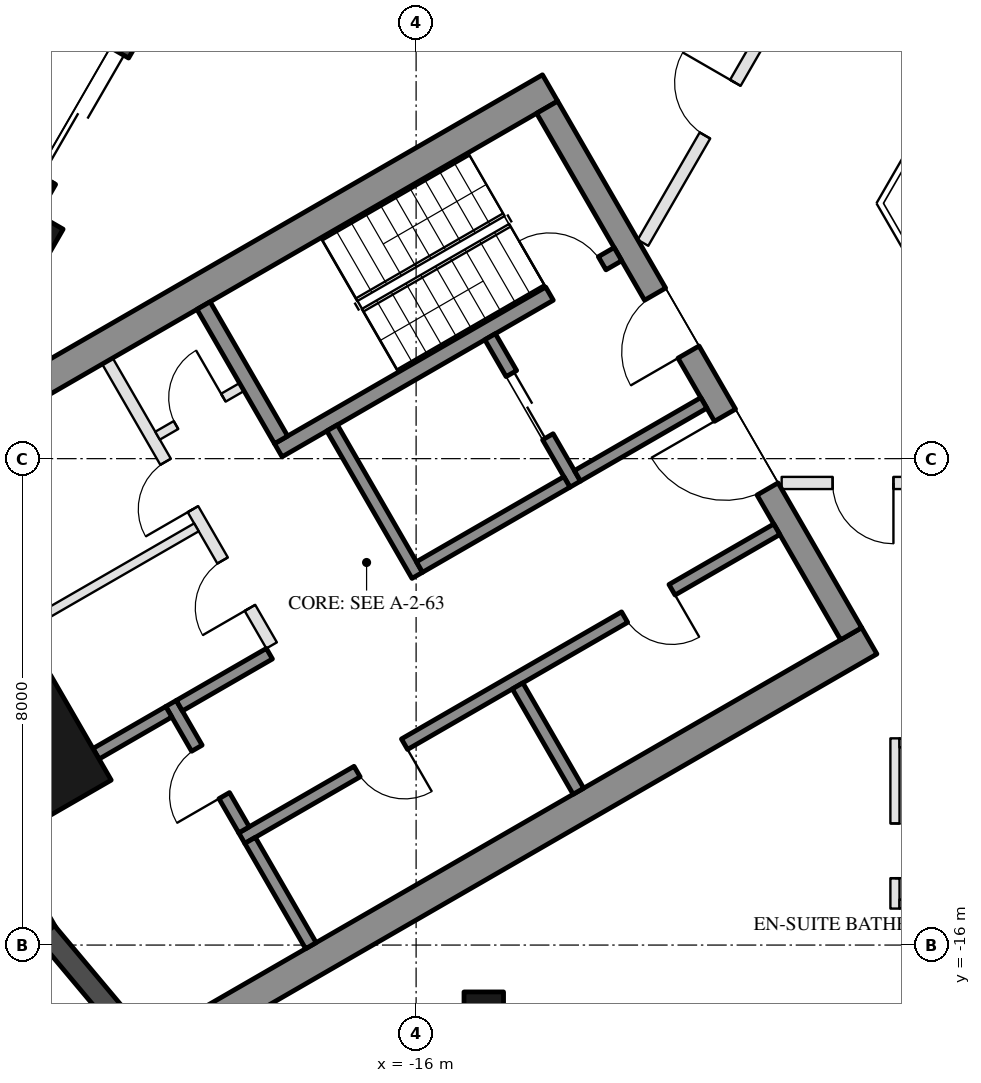
"""IFC4 building model, lengths in metres.
Left out: names, types, materials, properties, quantities, classifications, styles, units other than length and angle.
Written with IfcOpenShell. Run it as: python <this file> out.ifc"""

import sys

from ifc_helpers import new_model, si_unit, direction, frame, frame_2d, origin, origin_2d, place, context, subcontext, project, spatial, rectangle, hollow_rectangle, extrude, boolean, halfspace, element, fill, save


model = new_model("IFC4")
c1 = context("Model", 3, precision=1e-05, world=origin(), true_north=direction((0.0, 1.0)))
c2 = subcontext(c1, "Body", "Model", "MODEL_VIEW")
j1 = project(units=[si_unit("LENGTHUNIT", "METRE"), si_unit("PLANEANGLEUNIT", "RADIAN")], contexts=[c1])
p1 = place(None, origin())
s1 = spatial("IfcSite", under=j1, at=p1, CompositionType="ELEMENT")
p2 = place(p1, origin())
s2 = spatial("IfcBuilding", under=s1, at=p2, CompositionType="ELEMENT")
p3 = place(p2, frame((0.0, 0.0, 272.6)))
s3 = spatial("IfcBuildingStorey", under=s2, at=p3, CompositionType="ELEMENT", Elevation=272.6)
for number, where, z_axis, x_axis in (
    (1, (-14.887, -17.096, 0.0), (0.0, 0.0, 1.0), (-1.0, 0.0, 0.0)),
    (2, (-22.249, -4.345, 0.0), (0.0, 0.0, 1.0), (0.5, 0.866, 0.0)),
):
    element("IfcColumn", number, at=place(p3, frame(where, z_axis=z_axis, x_axis=x_axis)), inside=s3, PredefinedType="COLUMN", context=c2, shape_type="SweptSolid", body=[
        boolean("DIFFERENCE", extrude(hollow_rectangle(XDim=0.65, YDim=0.65, WallThickness=0.03, at=origin_2d()), origin(), (0.0, 0.0, 1.0), 3.7), halfspace(frame((0.0, 0.0, 3.653), z_axis=(0.0, 0.0, 1.0), x_axis=(1.0, 0.0, 0.0)), False)),
    ])
p4 = place(p3, frame((-22.38, -12.921, 0.0), z_axis=(0.0, 0.0, 1.0), x_axis=(-0.5, 0.866025403784, 0.0)))
e3 = element("IfcColumn", 3, at=p4, inside=s3, PredefinedType="COLUMN", context=c2, shape_type="SweptSolid", body=[
    boolean("DIFFERENCE", extrude(hollow_rectangle(XDim=2.0, YDim=2.0, WallThickness=0.05, at=origin_2d()), origin(), (0.0, 0.0, 1.0), 3.7), halfspace(frame((0.0, 0.0, 3.587), z_axis=(0.0, 0.0, 1.0), x_axis=(1.0, 0.0, 0.0)), False)),
])
p5 = place(p3, frame((-19.099, 1.762, 0.0), z_axis=(0.0, 0.0, 1.0), x_axis=(-0.500012817413, -0.866018003521, 0.0)))
e4 = element("IfcWall", 4, at=p5, inside=s3, PredefinedType="SOLIDWALL", context=c2, shape_type="SweptSolid", body=[
    extrude(rectangle(XDim=6.283, YDim=0.35, at=frame_2d((3.142, 0.0))), origin(), (0.0, 0.0, 1.0), 3.55),
])
p6 = place(p5, frame((3.563, 0.0, 0.0)))
e5 = element("IfcOpeningElement", 5, at=p6, cuts=e4, PredefinedType="OPENING", context=c2, shape_type="SweptSolid", body=[
    extrude(rectangle(XDim=2.4, YDim=2.4, at=frame_2d((1.2, 1.2))), frame((0.0, 0.185, 0.0), z_axis=(0.0, -1.0, 0.0), x_axis=(1.0, 0.0, 0.0)), (0.0, 0.0, 1.0), 0.37),
])
p7 = place(p5, frame((0.77, 0.0, 0.3)))
e6 = element("IfcOpeningElement", 6, at=p7, cuts=e4, PredefinedType="OPENING", context=c2, shape_type="SweptSolid", body=[
    extrude(rectangle(XDim=2.4, YDim=2.65, at=frame_2d((1.2, 1.325))), frame((0.0, 0.185, 0.0), z_axis=(0.0, -1.0, 0.0), x_axis=(1.0, 0.0, 0.0)), (0.0, 0.0, 1.0), 0.37),
])
p8 = place(p3, frame((-22.042, -3.627, 0.0), z_axis=(0.0, 0.0, 1.0), x_axis=(-0.866005645448, 0.500034220881, 0.0)))
e7 = element("IfcWall", 7, at=p8, inside=s3, PredefinedType="SOLIDWALL", context=c2, shape_type="SweptSolid", body=[
    extrude(rectangle(XDim=1.22, YDim=0.35, at=frame_2d((0.61, 0.0))), origin(), (0.0, 0.0, 1.0), 3.55),
])
p9 = place(p3, frame((-24.731, -11.2, 0.0), z_axis=(0.0, 0.0, 1.0), x_axis=(0.500025039717, -0.866010946615, 0.0)))
e8 = element("IfcWall", 8, at=p9, inside=s3, PredefinedType="SOLIDWALL", context=c2, shape_type="SweptSolid", body=[
    extrude(rectangle(XDim=5.331, YDim=0.35, at=frame_2d((2.666, 0.0))), origin(), (0.0, 0.0, 1.0), 3.55),
])
p10 = place(p3, frame((-22.083, -15.792, 0.0), z_axis=(0.0, 0.0, 1.0), x_axis=(0.642756114672, -0.766070869471, 0.0)))
e9 = element("IfcWall", 9, at=p10, inside=s3, PredefinedType="SOLIDWALL", context=c2, shape_type="SweptSolid", body=[
    extrude(rectangle(XDim=1.8, YDim=0.35, at=frame_2d((0.9, 0.0))), origin(), (0.0, 0.0, 1.0), 3.55),
])
for number, where, z_axis, x_axis in (
    (10, (-13.797, -1.903, 0.0), (0.0, 0.0, 1.0), (-0.866, -0.5, 0.0)),
    (11, (-8.547, -10.997, 0.0), (0.0, 0.0, 1.0), (-0.866, -0.5, 0.0)),
):
    element("IfcWall", number, at=place(p3, frame(where, z_axis=z_axis, x_axis=x_axis)), inside=s3, PredefinedType="SHEAR", context=c2, shape_type="SweptSolid", body=[
        extrude(rectangle(XDim=13.031, YDim=0.5, at=frame_2d((6.516, 0.0))), origin(), (0.0, 0.0, 1.0), 3.5),
    ])
p11 = place(p3, frame((-13.845, -2.22, 0.0), z_axis=(0.0, 0.0, 1.0), x_axis=(0.500004234368, -0.866022959057, 0.0)))
e12 = element("IfcWall", 12, at=p11, inside=s3, PredefinedType="SHEAR", context=c2, shape_type="SweptSolid", body=[
    extrude(rectangle(XDim=10.0, YDim=0.4, at=frame_2d((5.0, 0.0))), origin(), (0.0, 0.0, 1.0), 3.5),
])
p12 = place(p11, frame((3.55, 0.0, 0.0)))
e13 = element("IfcOpeningElement", 13, at=p12, cuts=e12, PredefinedType="OPENING", context=c2, shape_type="SweptSolid", body=[
    extrude(rectangle(XDim=1.1, YDim=2.1, at=frame_2d((0.55, 1.05))), frame((0.0, 0.21, 0.0), z_axis=(0.0, -1.0, 0.0), x_axis=(1.0, 0.0, 0.0)), (0.0, 0.0, 1.0), 0.42),
])
p13 = place(p11, frame((5.85, 0.0, 0.0)))
e14 = element("IfcOpeningElement", 14, at=p13, cuts=e12, PredefinedType="OPENING", context=c2, shape_type="SweptSolid", body=[
    extrude(rectangle(XDim=1.4, YDim=2.1, at=frame_2d((0.7, 1.05))), frame((0.0, 0.21, 0.0), z_axis=(0.0, -1.0, 0.0), x_axis=(1.0, 0.0, 0.0)), (0.0, 0.0, 1.0), 0.42),
])
p14 = place(p3, frame((-12.681, -4.636, 0.0), z_axis=(0.0, 0.0, 1.0), x_axis=(-0.866021702275, -0.500006411147, 0.0)))
e15 = element("IfcWall", 15, at=p14, inside=s3, PredefinedType="SHEAR", context=c2, shape_type="SweptSolid", body=[
    extrude(rectangle(XDim=6.45, YDim=0.25, at=frame_2d((3.225, 0.0))), origin(), (0.0, 0.0, 1.0), 3.5),
])
p15 = place(p14, frame((0.3, 0.0, 0.0)))
e16 = element("IfcOpeningElement", 16, at=p15, cuts=e15, PredefinedType="OPENING", context=c2, shape_type="SweptSolid", body=[
    extrude(rectangle(XDim=1.0, YDim=2.1, at=frame_2d((0.5, 1.05))), frame((0.0, 0.135, 0.0), z_axis=(0.0, -1.0, 0.0), x_axis=(1.0, 0.0, 0.0)), (0.0, 0.0, 1.0), 0.27),
])
p16 = place(p3, frame((-19.496, -5.482, 0.0), z_axis=(0.0, 0.0, 1.0), x_axis=(0.499990435942, -0.866030925526, 0.0)))
e17 = element("IfcWall", 17, at=p16, inside=s3, PredefinedType="SHEAR", context=c2, shape_type="SweptSolid", body=[
    extrude(rectangle(XDim=2.55, YDim=0.25, at=frame_2d((1.275, 0.0))), origin(), (0.0, 0.0, 1.0), 3.5),
])
p17 = place(p3, frame((-17.381, -7.495, 0.0), z_axis=(0.0, 0.0, 1.0), x_axis=(0.500011755427, -0.866018616679, 0.0)))
e18 = element("IfcWall", 18, at=p17, inside=s3, PredefinedType="SHEAR", context=c2, shape_type="SweptSolid", body=[
    extrude(rectangle(XDim=2.8, YDim=0.2, at=frame_2d((1.4, 0.0))), origin(), (0.0, 0.0, 1.0), 3.5),
])
p18 = place(p3, frame((-14.783, -5.995, 0.0), z_axis=(0.0, 0.0, 1.0), x_axis=(0.49994636267, -0.866056369097, 0.0)))
e19 = element("IfcWall", 19, at=p18, inside=s3, PredefinedType="SHEAR", context=c2, shape_type="SweptSolid", body=[
    extrude(rectangle(XDim=2.8, YDim=0.2, at=frame_2d((1.4, 0.0))), origin(), (0.0, 0.0, 1.0), 3.5),
])
p19 = place(p18, frame((0.7, 0.0, 0.0)))
e20 = element("IfcOpeningElement", 20, at=p19, cuts=e19, PredefinedType="OPENING", context=c2, shape_type="SweptSolid", body=[
    extrude(rectangle(XDim=1.2, YDim=2.1, at=frame_2d((0.6, 1.05))), frame((0.0, 0.11, 0.0), z_axis=(0.0, -1.0, 0.0), x_axis=(1.0, 0.0, 0.0)), (0.0, 0.0, 1.0), 0.22),
])
p20 = place(p3, frame((-13.52, -8.383, 0.0), z_axis=(0.0, 0.0, 1.0), x_axis=(-0.866034573852, -0.49998411664, 0.0)))
e21 = element("IfcWall", 21, at=p20, inside=s3, PredefinedType="SHEAR", context=c2, shape_type="SweptSolid", body=[
    extrude(rectangle(XDim=2.8, YDim=0.2, at=frame_2d((1.4, 0.0))), origin(), (0.0, 0.0, 1.0), 3.5),
])
p21 = place(p3, frame((-11.268, -7.083, 0.0), z_axis=(0.0, 0.0, 1.0), x_axis=(-0.866050077142, -0.499957262057, 0.0)))
e22 = element("IfcWall", 22, at=p21, inside=s3, PredefinedType="SHEAR", context=c2, shape_type="SweptSolid", body=[
    extrude(rectangle(XDim=2.4, YDim=0.2, at=frame_2d((1.2, 0.0))), origin(), (0.0, 0.0, 1.0), 3.5),
])
p22 = place(p3, frame((-10.068, -9.162, 0.0), z_axis=(0.0, 0.0, 1.0), x_axis=(-0.866032725843, -0.499987317609, 0.0)))
e23 = element("IfcWall", 23, at=p22, inside=s3, PredefinedType="SHEAR", context=c2, shape_type="SweptSolid", body=[
    extrude(rectangle(XDim=10.16, YDim=0.2, at=frame_2d((5.08, 0.0))), origin(), (0.0, 0.0, 1.0), 3.5),
])
p23 = place(p22, frame((1.99, 0.0, 0.0)))
e24 = element("IfcOpeningElement", 24, at=p23, cuts=e23, PredefinedType="OPENING", context=c2, shape_type="SweptSolid", body=[
    extrude(rectangle(XDim=0.9, YDim=2.1, at=frame_2d((0.45, 1.05))), frame((0.0, 0.11, 0.0), z_axis=(0.0, -1.0, 0.0), x_axis=(1.0, 0.0, 0.0)), (0.0, 0.0, 1.0), 0.22),
])
p24 = place(p22, frame((7.07, 0.0, 0.0)))
e25 = element("IfcOpeningElement", 25, at=p24, cuts=e23, PredefinedType="OPENING", context=c2, shape_type="SweptSolid", body=[
    extrude(rectangle(XDim=0.9, YDim=2.1, at=frame_2d((0.45, 1.05))), frame((0.0, 0.11, 0.0), z_axis=(0.0, -1.0, 0.0), x_axis=(1.0, 0.0, 0.0)), (0.0, 0.0, 1.0), 0.22),
])
p25 = place(p3, frame((-20.031, -12.026, 0.0), z_axis=(0.0, 0.0, 1.0), x_axis=(0.500033551112, -0.866006032174, 0.0)))
e26 = element("IfcWall", 26, at=p25, inside=s3, PredefinedType="SHEAR", context=c2, shape_type="SweptSolid", body=[
    extrude(rectangle(XDim=2.4, YDim=0.2, at=frame_2d((1.2, 0.0))), origin(), (0.0, 0.0, 1.0), 3.5),
])
p26 = place(p25, frame((0.85, 0.0, 0.0)))
e27 = element("IfcOpeningElement", 27, at=p26, cuts=e26, PredefinedType="OPENING", context=c2, shape_type="SweptSolid", body=[
    extrude(rectangle(XDim=0.9, YDim=2.1, at=frame_2d((0.45, 1.05))), frame((0.0, 0.11, 0.0), z_axis=(0.0, -1.0, 0.0), x_axis=(1.0, 0.0, 0.0)), (0.0, 0.0, 1.0), 0.22),
])
p27 = place(p3, frame((-18.413, -11.208, 0.0), z_axis=(0.0, 0.0, 1.0), x_axis=(-0.866038183914, -0.499977863513, 0.0)))
e28 = element("IfcWall", 28, at=p27, inside=s3, PredefinedType="SHEAR", context=c2, shape_type="SweptSolid", body=[
    extrude(rectangle(XDim=1.71, YDim=0.2, at=frame_2d((0.855, 0.0))), origin(), (0.0, 0.0, 1.0), 3.5),
])
for number, where, z_axis, x_axis in (
    (29, (-14.331, -11.738, 0.0), (0.0, 0.0, 1.0), (0.5, -0.866, 0.0)),
    (30, (-18.73, -14.278, 0.0), (0.0, 0.0, 1.0), (0.5, -0.866, 0.0)),
):
    element("IfcWall", number, at=place(p3, frame(where, z_axis=z_axis, x_axis=x_axis)), inside=s3, PredefinedType="SHEAR", context=c2, shape_type="SweptSolid", body=[
        extrude(rectangle(XDim=2.0, YDim=0.2, at=frame_2d((1.0, 0.0))), origin(), (0.0, 0.0, 1.0), 3.5),
    ])
p28 = place(p3, frame((-20.067, -12.163, 0.0), z_axis=(0.0, 0.0, 1.0), x_axis=(-0.866094443108, -0.499880401313, 0.0)))
e31 = element("IfcWall", 31, at=p28, inside=s3, PredefinedType="SHEAR", context=c2, shape_type="SweptSolid", body=[
    extrude(rectangle(XDim=1.383, YDim=0.2, at=frame_2d((0.691, 0.0))), origin(), (0.0, 0.0, 1.0), 3.5),
])
p29 = place(p3, frame((-21.076, -6.395, 0.0), z_axis=(0.0, 0.0, 1.0), x_axis=(0.50001468107, -0.866016927499, 0.0)))
e32 = element("IfcWall", 32, at=p29, inside=s3, PredefinedType="PARTITIONING", context=c2, shape_type="SweptSolid", body=[
    extrude(rectangle(XDim=5.4, YDim=0.2, at=frame_2d((2.7, 0.0))), origin(), (0.0, 0.0, 1.0), 3.5),
])
p30 = place(p29, frame((1.913, 0.0, 0.0)))
e33 = element("IfcOpeningElement", 33, at=p30, cuts=e32, PredefinedType="OPENING", context=c2, shape_type="SweptSolid", body=[
    extrude(rectangle(XDim=0.9, YDim=2.1, at=frame_2d((0.45, 1.05))), frame((0.0, 0.11, 0.0), z_axis=(0.0, -1.0, 0.0), x_axis=(1.0, 0.0, 0.0)), (0.0, 0.0, 1.0), 0.22),
])
p31 = place(p29, frame((3.788, 0.0, 0.0)))
e34 = element("IfcOpeningElement", 34, at=p31, cuts=e32, PredefinedType="OPENING", context=c2, shape_type="SweptSolid", body=[
    extrude(rectangle(XDim=0.9, YDim=2.1, at=frame_2d((0.45, 1.05))), frame((0.0, 0.11, 0.0), z_axis=(0.0, -1.0, 0.0), x_axis=(1.0, 0.0, 0.0)), (0.0, 0.0, 1.0), 0.22),
])
p32 = place(p3, frame((-18.866, -6.822, 0.0), z_axis=(0.0, 0.0, 1.0), x_axis=(-0.866028054938, -0.499995408039, 0.0)))
e35 = element("IfcWall", 35, at=p32, inside=s3, PredefinedType="PARTITIONING", context=c2, shape_type="SweptSolid", body=[
    extrude(rectangle(XDim=1.6, YDim=0.15, at=frame_2d((0.8, 0.0))), origin(), (0.0, 0.0, 1.0), 3.5),
])
p33 = place(p32, frame((0.35, 0.0, 0.0)))
e36 = element("IfcOpeningElement", 36, at=p33, cuts=e35, PredefinedType="OPENING", context=c2, shape_type="SweptSolid", body=[
    extrude(rectangle(XDim=0.9, YDim=2.1, at=frame_2d((0.45, 1.05))), frame((0.0, 0.085, 0.0), z_axis=(0.0, -1.0, 0.0), x_axis=(1.0, 0.0, 0.0)), (0.0, 0.0, 1.0), 0.17),
])
p34 = place(p3, frame((-19.613, -9.13, 0.0), z_axis=(0.0, 0.0, 1.0), x_axis=(-0.866028878405, -0.499993981732, 0.0)))
e37 = element("IfcWall", 37, at=p34, inside=s3, PredefinedType="PARTITIONING", context=c2, shape_type="SweptSolid", body=[
    extrude(rectangle(XDim=5.292, YDim=0.15, at=frame_2d((2.646, 0.0))), origin(), (0.0, 0.0, 1.0), 3.5),
])
p35 = place(p3, frame((-6.2, -8.4, 0.0), z_axis=(0.0, 0.0, 1.0), x_axis=(-1.0, 0.0, 0.0)))
e38 = element("IfcWall", 38, at=p35, inside=s3, PredefinedType="PARTITIONING", context=c2, shape_type="SweptSolid", body=[
    extrude(rectangle(XDim=3.788, YDim=0.2, at=frame_2d((1.894, 0.0))), origin(), (0.0, 0.0, 1.0), 3.0),
])
p36 = place(p35, frame((1.95, 0.0, 0.0)))
e39 = element("IfcOpeningElement", 39, at=p36, cuts=e38, PredefinedType="OPENING", context=c2, shape_type="SweptSolid", body=[
    extrude(rectangle(XDim=1.0, YDim=2.1, at=frame_2d((0.5, 1.05))), frame((0.0, 0.11, 0.0), z_axis=(0.0, -1.0, 0.0), x_axis=(1.0, 0.0, 0.0)), (0.0, 0.0, 1.0), 0.22),
])
p37 = place(p3, frame((-8.125, -12.6, 0.0), z_axis=(0.0, 0.0, 1.0), x_axis=(0.0, -1.0, 0.0)))
e40 = element("IfcWall", 40, at=p37, inside=s3, PredefinedType="PARTITIONING", context=c2, shape_type="SweptSolid", body=[
    extrude(rectangle(XDim=2.8, YDim=0.15, at=frame_2d((1.4, 0.0))), origin(), (0.0, 0.0, 1.0), 3.55),
])
p38 = place(p37, frame((1.4, 0.0, 0.0)))
e41 = element("IfcOpeningElement", 41, at=p38, cuts=e40, PredefinedType="OPENING", context=c2, shape_type="SweptSolid", body=[
    extrude(rectangle(XDim=0.9, YDim=2.1, at=frame_2d((0.45, 1.05))), frame((0.0, 0.085, 0.0), z_axis=(0.0, -1.0, 0.0), x_axis=(1.0, 0.0, 0.0)), (0.0, 0.0, 1.0), 0.17),
])
for number, where, z_axis, x_axis in (
    (42, (-8.05, -15.325, 0.0), (0.0, 0.0, 1.0), (1.0, 0.0, 0.0)),
    (43, (-8.05, -12.675, 0.0), (0.0, 0.0, 1.0), (1.0, 0.0, 0.0)),
):
    element("IfcWall", number, at=place(p3, frame(where, z_axis=z_axis, x_axis=x_axis)), inside=s3, PredefinedType="PARTITIONING", context=c2, shape_type="SweptSolid", body=[
        extrude(rectangle(XDim=1.85, YDim=0.15, at=frame_2d((0.925, 0.0))), origin(), (0.0, 0.0, 1.0), 3.0),
    ])
p39 = place(p3, frame((-12.269, -4.45, 0.0), z_axis=(0.0, 0.0, 1.0), x_axis=(0.500023578739, 0.866011790165, 0.0)))
e44 = element("IfcWall", 44, at=p39, inside=s3, PredefinedType="PARTITIONING", context=c2, shape_type="SweptSolid", body=[
    extrude(rectangle(XDim=5.076, YDim=0.2, at=frame_2d((2.538, 0.0))), origin(), (0.0, 0.0, 1.0), 3.0),
])
p40 = place(p39, frame((2.038, 0.0, 0.0)))
e45 = element("IfcOpeningElement", 45, at=p40, cuts=e44, PredefinedType="OPENING", context=c2, shape_type="SweptSolid", body=[
    extrude(rectangle(XDim=1.0, YDim=2.1, at=frame_2d((0.5, 1.05))), frame((0.0, 0.11, 0.0), z_axis=(0.0, -1.0, 0.0), x_axis=(1.0, 0.0, 0.0)), (0.0, 0.0, 1.0), 0.22),
])
p41 = place(p6, frame((2.4, 0.0, 0.0), z_axis=(0.0, 0.0, 1.0), x_axis=(-1.0, 0.0, 0.0)))
e46 = element("IfcDoor", 46, at=p41, inside=s3, OperationType="SLIDING_TO_LEFT", PredefinedType="DOOR", context=c2, shape_type="SweptSolid", body=[
    extrude(rectangle(XDim=2.4, YDim=2.4, at=frame_2d((1.2, 1.2))), frame((0.0, 0.025, 0.0), z_axis=(0.0, -1.0, 0.0), x_axis=(1.0, 0.0, 0.0)), (0.0, 0.0, 1.0), 0.05),
])
fill(e5, e46)
p42 = place(p19, origin())
e47 = element("IfcDoor", 47, at=p42, inside=s3, OperationType="DOUBLE_DOOR_SLIDING", PredefinedType="DOOR", context=c2, shape_type="SweptSolid", body=[
    extrude(rectangle(XDim=1.2, YDim=2.1, at=frame_2d((0.6, 1.05))), frame((0.0, 0.025, 0.0), z_axis=(0.0, -1.0, 0.0), x_axis=(1.0, 0.0, 0.0)), (0.0, 0.0, 1.0), 0.05),
])
fill(e20, e47)
p43 = place(p33, frame((0.9, 0.0, 0.0), z_axis=(0.0, 0.0, 1.0), x_axis=(-1.0, 0.0, 0.0)))
e48 = element("IfcDoor", 48, at=p43, inside=s3, OperationType="SINGLE_SWING_RIGHT", PredefinedType="DOOR", context=c2, shape_type="SweptSolid", body=[
    extrude(rectangle(XDim=0.9, YDim=2.1, at=frame_2d((0.45, 1.05))), frame((0.0, 0.025, 0.0), z_axis=(0.0, -1.0, 0.0), x_axis=(1.0, 0.0, 0.0)), (0.0, 0.0, 1.0), 0.05),
])
fill(e36, e48)
p44 = place(p23, origin())
e49 = element("IfcDoor", 49, at=p44, inside=s3, OperationType="SINGLE_SWING_LEFT", PredefinedType="DOOR", context=c2, shape_type="SweptSolid", body=[
    extrude(rectangle(XDim=0.9, YDim=2.1, at=frame_2d((0.45, 1.05))), frame((0.0, 0.025, 0.0), z_axis=(0.0, -1.0, 0.0), x_axis=(1.0, 0.0, 0.0)), (0.0, 0.0, 1.0), 0.05),
])
fill(e24, e49)
p45 = place(p24, origin())
e50 = element("IfcDoor", 50, at=p45, inside=s3, OperationType="SINGLE_SWING_LEFT", PredefinedType="DOOR", context=c2, shape_type="SweptSolid", body=[
    extrude(rectangle(XDim=0.9, YDim=2.1, at=frame_2d((0.45, 1.05))), frame((0.0, 0.025, 0.0), z_axis=(0.0, -1.0, 0.0), x_axis=(1.0, 0.0, 0.0)), (0.0, 0.0, 1.0), 0.05),
])
fill(e25, e50)
p46 = place(p26, frame((0.9, 0.0, 0.0), z_axis=(0.0, 0.0, 1.0), x_axis=(-1.0, 0.0, 0.0)))
e51 = element("IfcDoor", 51, at=p46, inside=s3, OperationType="SINGLE_SWING_LEFT", PredefinedType="DOOR", context=c2, shape_type="SweptSolid", body=[
    extrude(rectangle(XDim=0.9, YDim=2.1, at=frame_2d((0.45, 1.05))), frame((0.0, 0.025, 0.0), z_axis=(0.0, -1.0, 0.0), x_axis=(1.0, 0.0, 0.0)), (0.0, 0.0, 1.0), 0.05),
])
fill(e27, e51)
p47 = place(p30, frame((0.9, 0.0, 0.0), z_axis=(0.0, 0.0, 1.0), x_axis=(-1.0, 0.0, 0.0)))
e52 = element("IfcDoor", 52, at=p47, inside=s3, OperationType="SINGLE_SWING_LEFT", PredefinedType="DOOR", context=c2, shape_type="SweptSolid", body=[
    extrude(rectangle(XDim=0.9, YDim=2.1, at=frame_2d((0.45, 1.05))), frame((0.0, 0.025, 0.0), z_axis=(0.0, -1.0, 0.0), x_axis=(1.0, 0.0, 0.0)), (0.0, 0.0, 1.0), 0.05),
])
fill(e33, e52)
p48 = place(p31, frame((0.9, 0.0, 0.0), z_axis=(0.0, 0.0, 1.0), x_axis=(-1.0, 0.0, 0.0)))
e53 = element("IfcDoor", 53, at=p48, inside=s3, OperationType="SINGLE_SWING_LEFT", PredefinedType="DOOR", context=c2, shape_type="SweptSolid", body=[
    extrude(rectangle(XDim=0.9, YDim=2.1, at=frame_2d((0.45, 1.05))), frame((0.0, 0.025, 0.0), z_axis=(0.0, -1.0, 0.0), x_axis=(1.0, 0.0, 0.0)), (0.0, 0.0, 1.0), 0.05),
])
fill(e34, e53)
p49 = place(p12, frame((1.1, 0.0, 0.0), z_axis=(0.0, 0.0, 1.0), x_axis=(-1.0, 0.0, 0.0)))
e54 = element("IfcDoor", 54, at=p49, inside=s3, OperationType="SINGLE_SWING_LEFT", PredefinedType="DOOR", context=c2, shape_type="SweptSolid", body=[
    extrude(rectangle(XDim=1.1, YDim=2.1, at=frame_2d((0.55, 1.05))), frame((0.0, 0.025, 0.0), z_axis=(0.0, -1.0, 0.0), x_axis=(1.0, 0.0, 0.0)), (0.0, 0.0, 1.0), 0.05),
])
fill(e13, e54)
p50 = place(p13, frame((1.4, 0.0, 0.0), z_axis=(0.0, 0.0, 1.0), x_axis=(-1.0, 0.0, 0.0)))
e55 = element("IfcDoor", 55, at=p50, inside=s3, OperationType="DOUBLE_DOOR_SINGLE_SWING", PredefinedType="DOOR", context=c2, shape_type="SweptSolid", body=[
    extrude(rectangle(XDim=1.4, YDim=2.1, at=frame_2d((0.7, 1.05))), frame((0.0, 0.025, 0.0), z_axis=(0.0, -1.0, 0.0), x_axis=(1.0, 0.0, 0.0)), (0.0, 0.0, 1.0), 0.05),
])
fill(e14, e55)
p51 = place(p15, frame((1.0, 0.0, 0.0), z_axis=(0.0, 0.0, 1.0), x_axis=(-1.0, 0.0, 0.0)))
e56 = element("IfcDoor", 56, at=p51, inside=s3, OperationType="SINGLE_SWING_LEFT", PredefinedType="DOOR", context=c2, shape_type="SweptSolid", body=[
    extrude(rectangle(XDim=1.0, YDim=2.1, at=frame_2d((0.5, 1.05))), frame((0.0, 0.025, 0.0), z_axis=(0.0, -1.0, 0.0), x_axis=(1.0, 0.0, 0.0)), (0.0, 0.0, 1.0), 0.05),
])
fill(e16, e56)
p52 = place(p38, origin())
e57 = element("IfcDoor", 57, at=p52, inside=s3, OperationType="SINGLE_SWING_RIGHT", PredefinedType="DOOR", context=c2, shape_type="SweptSolid", body=[
    extrude(rectangle(XDim=0.9, YDim=2.1, at=frame_2d((0.45, 1.05))), frame((0.0, 0.025, 0.0), z_axis=(0.0, -1.0, 0.0), x_axis=(1.0, 0.0, 0.0)), (0.0, 0.0, 1.0), 0.05),
])
fill(e41, e57)
p53 = place(p36, origin())
e58 = element("IfcDoor", 58, at=p53, inside=s3, OperationType="SINGLE_SWING_LEFT", PredefinedType="DOOR", context=c2, shape_type="SweptSolid", body=[
    extrude(rectangle(XDim=1.0, YDim=2.1, at=frame_2d((0.5, 1.05))), frame((0.0, 0.025, 0.0), z_axis=(0.0, -1.0, 0.0), x_axis=(1.0, 0.0, 0.0)), (0.0, 0.0, 1.0), 0.05),
])
fill(e39, e58)
p54 = place(p40, origin())
e59 = element("IfcDoor", 59, at=p54, inside=s3, OperationType="SINGLE_SWING_RIGHT", PredefinedType="DOOR", context=c2, shape_type="SweptSolid", body=[
    extrude(rectangle(XDim=1.0, YDim=2.1, at=frame_2d((0.5, 1.05))), frame((0.0, 0.025, 0.0), z_axis=(0.0, -1.0, 0.0), x_axis=(1.0, 0.0, 0.0)), (0.0, 0.0, 1.0), 0.05),
])
fill(e45, e59)
save(model, sys.argv[1])
